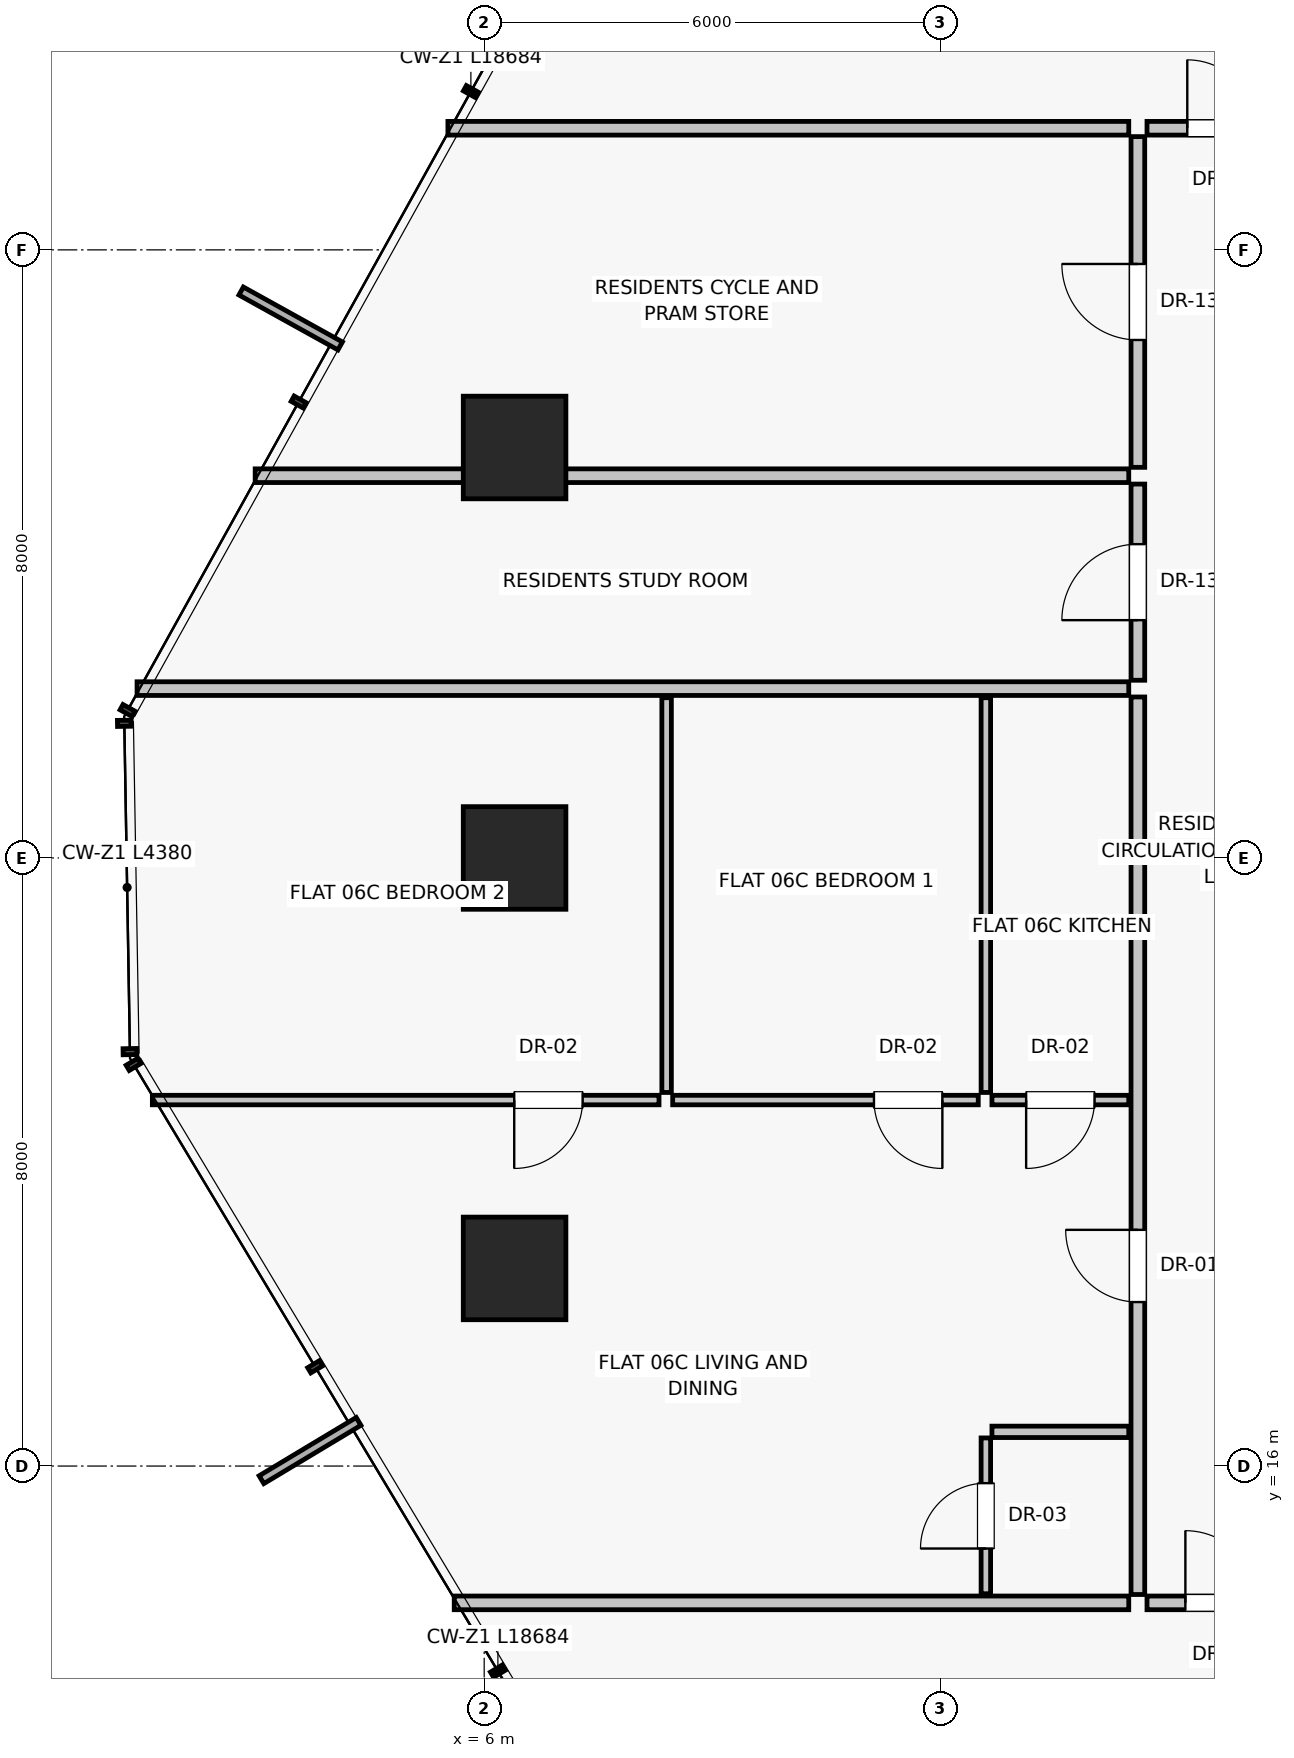
"""IFC4 building model, lengths in metres.
Left out: names, types, materials, properties, quantities, classifications, styles, units other than length and angle.
Written with IfcOpenShell. Run it as: python <this file> out.ifc"""

import sys

from ifc_helpers import new_model, si_unit, direction, frame, frame_2d, origin, origin_2d, place, context, subcontext, project, spatial, rectangle, extrude, source, transform, mapped, element, fill, save


model = new_model("IFC4")
c1 = context("Model", 3, precision=1e-05, world=origin(), true_north=direction((0.0, 1.0)))
c2 = subcontext(c1, "Body", "Model", "MODEL_VIEW")
j1 = project(units=[si_unit("LENGTHUNIT", "METRE"), si_unit("PLANEANGLEUNIT", "RADIAN")], contexts=[c1])
p1 = place(None, origin())
s1 = spatial("IfcSite", under=j1, at=p1, CompositionType="ELEMENT")
p2 = place(p1, origin())
s2 = spatial("IfcBuilding", under=s1, at=p2, CompositionType="ELEMENT")
p3 = place(p2, frame((0.0, 0.0, 27.3)))
s3 = spatial("IfcBuildingStorey", under=s2, at=p3, CompositionType="ELEMENT", Elevation=27.3)
for number, where, z_axis, x_axis in (
    (1, (6.4, 29.4, 0.0), (0.0, 0.0, 1.0), (1.0, 0.0, 0.0)),
    (2, (6.4, 24.0, 0.0), (0.0, 0.0, 1.0), (1.0, 0.0, 0.0)),
    (3, (6.4, 18.6, 0.0), (0.0, 0.0, 1.0), (1.0, 0.0, 0.0)),
):
    element("IfcColumn", number, at=place(p3, frame(where, z_axis=z_axis, x_axis=x_axis)), inside=s3, PredefinedType="COLUMN", context=c2, shape_type="SweptSolid", body=[
        extrude(rectangle(XDim=1.35, YDim=1.35, at=origin_2d()), origin(), (0.0, 0.0, 1.0), 3.25),
    ])
p4 = place(p3, frame((14.48, 14.2, 0.0), z_axis=(0.0, 0.0, 1.0), x_axis=(-1.0, 0.0, 0.0)))
e4 = element("IfcWall", 4, at=p4, inside=s3, PredefinedType="PARTITIONING", context=c2, shape_type="SweptSolid", body=[
    extrude(rectangle(XDim=8.874, YDim=0.18, at=frame_2d((4.437, 0.0))), origin(), (0.0, 0.0, 1.0), 3.0),
])
p5 = place(p3, frame((14.48, 33.6, 0.0), z_axis=(0.0, 0.0, 1.0), x_axis=(-1.0, 0.0, 0.0)))
e5 = element("IfcWall", 5, at=p5, inside=s3, PredefinedType="PARTITIONING", context=c2, shape_type="SweptSolid", body=[
    extrude(rectangle(XDim=8.957, YDim=0.18, at=frame_2d((4.479, 0.0))), origin(), (0.0, 0.0, 1.0), 3.0),
])
p6 = place(p3, frame((14.6, 14.31, 0.0), z_axis=(0.0, 0.0, 1.0), x_axis=(0.0, 1.0, 0.0)))
e6 = element("IfcWall", 6, at=p6, inside=s3, PredefinedType="PARTITIONING", context=c2, shape_type="SweptSolid", body=[
    extrude(rectangle(XDim=11.808, YDim=0.18, at=frame_2d((5.904, 0.0))), origin(), (0.0, 0.0, 1.0), 3.0),
])
p7 = place(p6, frame((3.847, 0.0, 0.0)))
e7 = element("IfcOpeningElement", 7, at=p7, cuts=e6, PredefinedType="OPENING", context=c2, shape_type="SweptSolid", body=[
    extrude(rectangle(XDim=0.95, YDim=2.02, at=frame_2d((0.475, 1.01))), frame((0.0, 0.1, 0.0), z_axis=(0.0, -1.0, 0.0), x_axis=(1.0, 0.0, 0.0)), (0.0, 0.0, 1.0), 0.2),
])
p8 = place(p3, frame((14.48, 16.45, 0.0), z_axis=(0.0, 0.0, 1.0), x_axis=(-1.0, 0.0, 0.0)))
e8 = element("IfcWall", 8, at=p8, inside=s3, PredefinedType="PARTITIONING", context=c2, shape_type="SweptSolid", body=[
    extrude(rectangle(XDim=1.8, YDim=0.15, at=frame_2d((0.9, 0.0))), origin(), (0.0, 0.0, 1.0), 3.0),
])
p9 = place(p3, frame((12.6, 14.32, 0.0), z_axis=(0.0, 0.0, 1.0), x_axis=(0.0, 1.0, 0.0)))
e9 = element("IfcWall", 9, at=p9, inside=s3, PredefinedType="PARTITIONING", context=c2, shape_type="SweptSolid", body=[
    extrude(rectangle(XDim=2.05, YDim=0.125, at=frame_2d((1.025, 0.0))), origin(), (0.0, 0.0, 1.0), 3.0),
])
p10 = place(p9, frame((0.595, 0.0, 0.0)))
e10 = element("IfcOpeningElement", 10, at=p10, cuts=e9, PredefinedType="OPENING", context=c2, shape_type="SweptSolid", body=[
    extrude(rectangle(XDim=0.86, YDim=2.01, at=frame_2d((0.43, 1.005))), frame((0.0, 0.073, 0.0), z_axis=(0.0, -1.0, 0.0), x_axis=(1.0, 0.0, 0.0)), (0.0, 0.0, 1.0), 0.145),
])
p11 = place(p3, frame((14.48, 20.815, 0.0), z_axis=(0.0, 0.0, 1.0), x_axis=(-1.0, 0.0, 0.0)))
e11 = element("IfcWall", 11, at=p11, inside=s3, PredefinedType="PARTITIONING", context=c2, shape_type="SweptSolid", body=[
    extrude(rectangle(XDim=1.8, YDim=0.125, at=frame_2d((0.9, 0.0))), origin(), (0.0, 0.0, 1.0), 3.0),
])
p12 = place(p11, frame((0.45, 0.0, 0.0)))
e12 = element("IfcOpeningElement", 12, at=p12, cuts=e11, PredefinedType="OPENING", context=c2, shape_type="SweptSolid", body=[
    extrude(rectangle(XDim=0.9, YDim=2.01, at=frame_2d((0.45, 1.005))), frame((0.0, 0.073, 0.0), z_axis=(0.0, -1.0, 0.0), x_axis=(1.0, 0.0, 0.0)), (0.0, 0.0, 1.0), 0.145),
])
for number, where, z_axis, x_axis in (
    (13, (12.6, 20.915, 0.0), (0.0, 0.0, 1.0), (0.0, 1.0, 0.0)),
    (14, (8.4, 20.915, 0.0), (0.0, 0.0, 1.0), (0.0, 1.0, 0.0)),
):
    element("IfcWall", number, at=place(p3, frame(where, z_axis=z_axis, x_axis=x_axis)), inside=s3, PredefinedType="PARTITIONING", context=c2, shape_type="SweptSolid", body=[
        extrude(rectangle(XDim=5.193, YDim=0.125, at=frame_2d((2.596, 0.0))), origin(), (0.0, 0.0, 1.0), 3.0),
    ])
p13 = place(p3, frame((12.5, 20.815, 0.0), z_axis=(0.0, 0.0, 1.0), x_axis=(-1.0, 0.0, 0.0)))
e15 = element("IfcWall", 15, at=p13, inside=s3, PredefinedType="PARTITIONING", context=c2, shape_type="SweptSolid", body=[
    extrude(rectangle(XDim=4.02, YDim=0.125, at=frame_2d((2.01, 0.0))), origin(), (0.0, 0.0, 1.0), 3.0),
])
p14 = place(p13, frame((0.472, 0.0, 0.0)))
e16 = element("IfcOpeningElement", 16, at=p14, cuts=e15, PredefinedType="OPENING", context=c2, shape_type="SweptSolid", body=[
    extrude(rectangle(XDim=0.9, YDim=2.01, at=frame_2d((0.45, 1.005))), frame((0.0, 0.073, 0.0), z_axis=(0.0, -1.0, 0.0), x_axis=(1.0, 0.0, 0.0)), (0.0, 0.0, 1.0), 0.145),
])
p15 = place(p3, frame((8.3, 20.815, 0.0), z_axis=(0.0, 0.0, 1.0), x_axis=(-1.0, 0.0, 0.0)))
e17 = element("IfcWall", 17, at=p15, inside=s3, PredefinedType="PARTITIONING", context=c2, shape_type="SweptSolid", body=[
    extrude(rectangle(XDim=6.666, YDim=0.125, at=frame_2d((3.333, 0.0))), origin(), (0.0, 0.0, 1.0), 3.0),
])
p16 = place(p15, frame((1.005, 0.0, 0.0)))
e18 = element("IfcOpeningElement", 18, at=p16, cuts=e17, PredefinedType="OPENING", context=c2, shape_type="SweptSolid", body=[
    extrude(rectangle(XDim=0.9, YDim=2.01, at=frame_2d((0.45, 1.005))), frame((0.0, 0.073, 0.0), z_axis=(0.0, -1.0, 0.0), x_axis=(1.0, 0.0, 0.0)), (0.0, 0.0, 1.0), 0.145),
])
p17 = place(p3, frame((14.48, 26.228, 0.0), z_axis=(0.0, 0.0, 1.0), x_axis=(-1.0, 0.0, 0.0)))
e19 = element("IfcWall", 19, at=p17, inside=s3, PredefinedType="PARTITIONING", context=c2, shape_type="SweptSolid", body=[
    extrude(rectangle(XDim=13.047, YDim=0.18, at=frame_2d((6.523, 0.0))), origin(), (0.0, 0.0, 1.0), 3.0),
])
p18 = place(p3, frame((14.6, 26.338, 0.0), z_axis=(0.0, 0.0, 1.0), x_axis=(0.0, 1.0, 0.0)))
e20 = element("IfcWall", 20, at=p18, inside=s3, PredefinedType="PARTITIONING", context=c2, shape_type="SweptSolid", body=[
    extrude(rectangle(XDim=2.581, YDim=0.18, at=frame_2d((1.291, 0.0))), origin(), (0.0, 0.0, 1.0), 3.0),
])
p19 = place(p18, frame((0.791, 0.0, 0.0)))
e21 = element("IfcOpeningElement", 21, at=p19, cuts=e20, PredefinedType="OPENING", context=c2, shape_type="SweptSolid", body=[
    extrude(rectangle(XDim=1.0, YDim=2.01, at=frame_2d((0.5, 1.005))), frame((0.0, 0.1, 0.0), z_axis=(0.0, -1.0, 0.0), x_axis=(1.0, 0.0, 0.0)), (0.0, 0.0, 1.0), 0.2),
])
p20 = place(p3, frame((14.6, 29.139, 0.0), z_axis=(0.0, 0.0, 1.0), x_axis=(0.0, 1.0, 0.0)))
e22 = element("IfcWall", 22, at=p20, inside=s3, PredefinedType="PARTITIONING", context=c2, shape_type="SweptSolid", body=[
    extrude(rectangle(XDim=4.351, YDim=0.18, at=frame_2d((2.176, 0.0))), origin(), (0.0, 0.0, 1.0), 3.0),
])
p21 = place(p20, frame((1.676, 0.0, 0.0)))
e23 = element("IfcOpeningElement", 23, at=p21, cuts=e22, PredefinedType="OPENING", context=c2, shape_type="SweptSolid", body=[
    extrude(rectangle(XDim=1.0, YDim=2.01, at=frame_2d((0.5, 1.005))), frame((0.0, 0.1, 0.0), z_axis=(0.0, -1.0, 0.0), x_axis=(1.0, 0.0, 0.0)), (0.0, 0.0, 1.0), 0.2),
])
p22 = place(p3, frame((14.48, 29.029, 0.0), z_axis=(0.0, 0.0, 1.0), x_axis=(-1.0, 0.0, 0.0)))
e24 = element("IfcWall", 24, at=p22, inside=s3, PredefinedType="PARTITIONING", context=c2, shape_type="SweptSolid", body=[
    extrude(rectangle(XDim=11.493, YDim=0.18, at=frame_2d((5.747, 0.0))), origin(), (0.0, 0.0, 1.0), 2.299),
])
p23 = place(p3, frame((14.72, 14.2, 0.0), z_axis=(0.0, 0.0, 1.0), x_axis=(1.0, 0.0, 0.0)))
e25 = element("IfcWall", 25, at=p23, inside=s3, PredefinedType="PARTITIONING", context=c2, shape_type="SweptSolid", body=[
    extrude(rectangle(XDim=1.96, YDim=0.18, at=frame_2d((0.98, 0.0))), origin(), (0.0, 0.0, 1.0), 3.0),
])
p24 = place(p23, frame((0.505, 0.0, 0.0)))
e26 = element("IfcOpeningElement", 26, at=p24, cuts=e25, PredefinedType="OPENING", context=c2, shape_type="SweptSolid", body=[
    extrude(rectangle(XDim=0.95, YDim=2.02, at=frame_2d((0.475, 1.01))), frame((0.0, 0.1, 0.0), z_axis=(0.0, -1.0, 0.0), x_axis=(1.0, 0.0, 0.0)), (0.0, 0.0, 1.0), 0.2),
])
p25 = place(p3, frame((14.72, 33.6, 0.0), z_axis=(0.0, 0.0, 1.0), x_axis=(1.0, 0.0, 0.0)))
e27 = element("IfcWall", 27, at=p25, inside=s3, PredefinedType="PARTITIONING", context=c2, shape_type="SweptSolid", body=[
    extrude(rectangle(XDim=1.96, YDim=0.18, at=frame_2d((0.98, 0.0))), origin(), (0.0, 0.0, 1.0), 3.0),
])
p26 = place(p25, frame((0.53, 0.0, 0.0)))
e28 = element("IfcOpeningElement", 28, at=p26, cuts=e27, PredefinedType="OPENING", context=c2, shape_type="SweptSolid", body=[
    extrude(rectangle(XDim=0.9, YDim=2.01, at=frame_2d((0.45, 1.005))), frame((0.0, 0.1, 0.0), z_axis=(0.0, -1.0, 0.0), x_axis=(1.0, 0.0, 0.0)), (0.0, 0.0, 1.0), 0.2),
])
m1 = source(origin(), c2, "Body", "SweptSolid", [
    extrude(rectangle(XDim=0.95, YDim=2.02, at=frame_2d((0.475, 1.01))), frame((0.0, 0.025, 0.0), z_axis=(0.0, -1.0, 0.0), x_axis=(1.0, 0.0, 0.0)), (0.0, 0.0, 1.0), 0.05),
])
p27 = place(p7, origin())
e29 = element("IfcDoor", 29, at=p27, inside=s3, OperationType="SINGLE_SWING_RIGHT", PredefinedType="DOOR", context=c2, shape_type="MappedRepresentation", body=[
    mapped(m1, transform((0.0, 0.0, 0.0), scale=1.0)),
])
fill(e7, e29)
m2 = source(origin(), c2, "Body", "SweptSolid", [
    extrude(rectangle(XDim=0.86, YDim=2.01, at=frame_2d((0.43, 1.005))), frame((0.0, 0.025, 0.0), z_axis=(0.0, -1.0, 0.0), x_axis=(1.0, 0.0, 0.0)), (0.0, 0.0, 1.0), 0.05),
])
p28 = place(p10, origin())
e30 = element("IfcDoor", 30, at=p28, inside=s3, OperationType="SINGLE_SWING_LEFT", PredefinedType="DOOR", context=c2, shape_type="MappedRepresentation", body=[
    mapped(m2, transform((0.0, 0.0, 0.0), scale=1.0)),
])
fill(e10, e30)
m3 = source(origin(), c2, "Body", "SweptSolid", [
    extrude(rectangle(XDim=0.9, YDim=2.01, at=frame_2d((0.45, 1.005))), frame((0.0, 0.025, 0.0), z_axis=(0.0, -1.0, 0.0), x_axis=(1.0, 0.0, 0.0)), (0.0, 0.0, 1.0), 0.05),
])
p29 = place(p12, origin())
e31 = element("IfcDoor", 31, at=p29, inside=s3, OperationType="SINGLE_SWING_RIGHT", PredefinedType="DOOR", context=c2, shape_type="MappedRepresentation", body=[
    mapped(m3, transform((0.0, 0.0, 0.0), scale=1.0)),
])
fill(e12, e31)
p30 = place(p14, origin())
e32 = element("IfcDoor", 32, at=p30, inside=s3, OperationType="SINGLE_SWING_LEFT", PredefinedType="DOOR", context=c2, shape_type="MappedRepresentation", body=[
    mapped(m3, transform((0.0, 0.0, 0.0), scale=1.0)),
])
fill(e16, e32)
p31 = place(p16, origin())
e33 = element("IfcDoor", 33, at=p31, inside=s3, OperationType="SINGLE_SWING_RIGHT", PredefinedType="DOOR", context=c2, shape_type="MappedRepresentation", body=[
    mapped(m3, transform((0.0, 0.0, 0.0), scale=1.0)),
])
fill(e18, e33)
m4 = source(origin(), c2, "Body", "SweptSolid", [
    extrude(rectangle(XDim=1.0, YDim=2.01, at=frame_2d((0.5, 1.005))), frame((0.0, 0.025, 0.0), z_axis=(0.0, -1.0, 0.0), x_axis=(1.0, 0.0, 0.0)), (0.0, 0.0, 1.0), 0.05),
])
p32 = place(p19, origin())
e34 = element("IfcDoor", 34, at=p32, inside=s3, OperationType="SINGLE_SWING_LEFT", PredefinedType="DOOR", context=c2, shape_type="MappedRepresentation", body=[
    mapped(m4, transform((0.0, 0.0, 0.0), scale=1.0)),
])
fill(e21, e34)
p33 = place(p21, origin())
e35 = element("IfcDoor", 35, at=p33, inside=s3, OperationType="SINGLE_SWING_RIGHT", PredefinedType="DOOR", context=c2, shape_type="MappedRepresentation", body=[
    mapped(m4, transform((0.0, 0.0, 0.0), scale=1.0)),
])
fill(e23, e35)
p34 = place(p24, origin())
e36 = element("IfcDoor", 36, at=p34, inside=s3, OperationType="SINGLE_SWING_LEFT", PredefinedType="DOOR", context=c2, shape_type="MappedRepresentation", body=[
    mapped(m1, transform((0.0, 0.0, 0.0), scale=1.0)),
])
fill(e26, e36)
p35 = place(p26, origin())
e37 = element("IfcDoor", 37, at=p35, inside=s3, OperationType="SINGLE_SWING_LEFT", PredefinedType="DOOR", context=c2, shape_type="MappedRepresentation", body=[
    mapped(m3, transform((0.0, 0.0, 0.0), scale=1.0)),
])
fill(e28, e37)
save(model, sys.argv[1])
